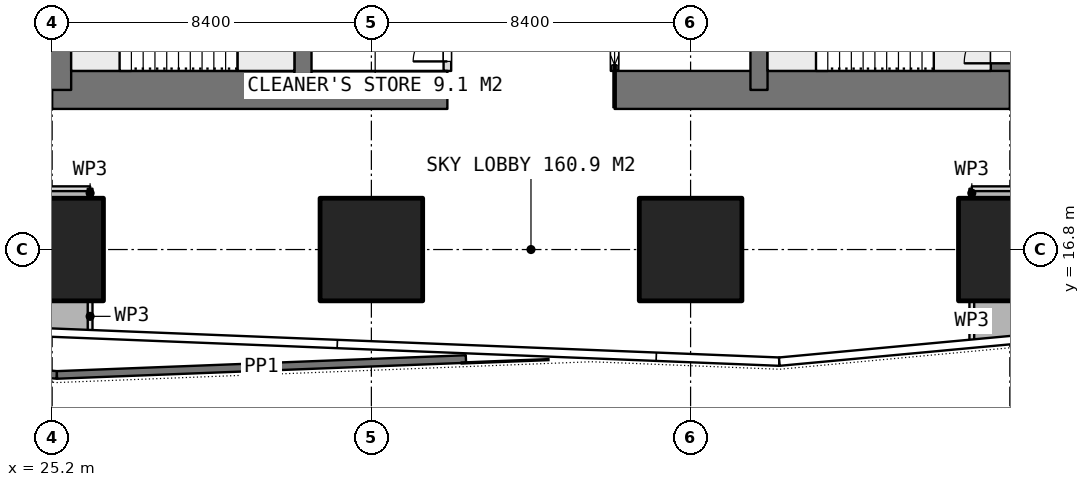
"""IFC4 building model, lengths in metres.
Left out: names, types, materials, properties, quantities, classifications, styles, units other than length and angle.
Written with IfcOpenShell. Run it as: python <this file> out.ifc"""

import sys

from ifc_helpers import new_model, si_unit, direction, frame, frame_2d, origin, origin_2d, place, context, subcontext, project, spatial, rectangle, extrude, element, fill, save


model = new_model("IFC4")
c1 = context("Model", 3, precision=1e-05, world=origin(), true_north=direction((0.0, 1.0)))
c2 = subcontext(c1, "Body", "Model", "MODEL_VIEW")
j1 = project(units=[si_unit("LENGTHUNIT", "METRE"), si_unit("PLANEANGLEUNIT", "RADIAN")], contexts=[c1])
p1 = place(None, origin())
s1 = spatial("IfcSite", under=j1, at=p1, CompositionType="ELEMENT")
p2 = place(p1, origin())
s2 = spatial("IfcBuilding", under=s1, at=p2, CompositionType="ELEMENT")
p3 = place(p2, frame((0.0, 0.0, 168.2)))
s3 = spatial("IfcBuildingStorey", under=s2, at=p3, CompositionType="ELEMENT", Elevation=168.2)
p4 = place(p3, frame((25.2, 21.0, 0.0), z_axis=(0.0, 0.0, 1.0), x_axis=(1.0, 0.0, 0.0)))
e1 = element("IfcWall", 1, at=p4, inside=s3, PredefinedType="SHEAR", context=c2, shape_type="SweptSolid", body=[
    extrude(rectangle(XDim=10.4, YDim=1.0, at=frame_2d((5.2, 0.0))), origin(), (0.0, 0.0, 1.0), 4.5),
])
p5 = place(p3, frame((40.0, 21.0, 0.0), z_axis=(0.0, 0.0, 1.0), x_axis=(1.0, 0.0, 0.0)))
e2 = element("IfcWall", 2, at=p5, inside=s3, PredefinedType="SHEAR", context=c2, shape_type="SweptSolid", body=[
    extrude(rectangle(XDim=10.4, YDim=1.0, at=frame_2d((5.2, 0.0))), origin(), (0.0, 0.0, 1.0), 4.5),
])
p6 = place(p3, frame((25.2, 21.0, 0.0), z_axis=(0.0, 0.0, 1.0), x_axis=(0.0, 1.0, 0.0)))
e3 = element("IfcWall", 3, at=p6, inside=s3, PredefinedType="SHEAR", context=c2, shape_type="SweptSolid", body=[
    extrude(rectangle(XDim=25.2, YDim=1.0, at=frame_2d((12.6, 0.0))), origin(), (0.0, 0.0, 1.0), 4.5),
])
p7 = place(p6, frame((7.8, 0.0, 0.0)))
e4 = element("IfcOpeningElement", 4, at=p7, cuts=e3, PredefinedType="OPENING", context=c2, shape_type="SweptSolid", body=[
    extrude(rectangle(XDim=1.2, YDim=2.1, at=frame_2d((0.6, 1.05))), frame((0.0, 0.51, 0.0), z_axis=(0.0, -1.0, 0.0), x_axis=(1.0, 0.0, 0.0)), (0.0, 0.0, 1.0), 1.02),
])
p8 = place(p6, frame((14.25, 0.0, 0.0)))
e5 = element("IfcOpeningElement", 5, at=p8, cuts=e3, PredefinedType="OPENING", context=c2, shape_type="SweptSolid", body=[
    extrude(rectangle(XDim=0.9, YDim=2.1, at=frame_2d((0.45, 1.05))), frame((0.0, 0.51, 0.0), z_axis=(0.0, -1.0, 0.0), x_axis=(1.0, 0.0, 0.0)), (0.0, 0.0, 1.0), 1.02),
])
p9 = place(p6, frame((16.85, 0.0, 0.0)))
e6 = element("IfcOpeningElement", 6, at=p9, cuts=e3, PredefinedType="OPENING", context=c2, shape_type="SweptSolid", body=[
    extrude(rectangle(XDim=0.9, YDim=2.1, at=frame_2d((0.45, 1.05))), frame((0.0, 0.51, 0.0), z_axis=(0.0, -1.0, 0.0), x_axis=(1.0, 0.0, 0.0)), (0.0, 0.0, 1.0), 1.02),
])
p10 = place(p6, frame((19.025, 0.0, 0.0)))
e7 = element("IfcOpeningElement", 7, at=p10, cuts=e3, PredefinedType="OPENING", context=c2, shape_type="SweptSolid", body=[
    extrude(rectangle(XDim=1.2, YDim=2.1, at=frame_2d((0.6, 1.05))), frame((0.0, 0.51, 0.0), z_axis=(0.0, -1.0, 0.0), x_axis=(1.0, 0.0, 0.0)), (0.0, 0.0, 1.0), 1.02),
])
p11 = place(p3, frame((50.4, 21.0, 0.0), z_axis=(0.0, 0.0, 1.0), x_axis=(0.0, 1.0, 0.0)))
e8 = element("IfcWall", 8, at=p11, inside=s3, PredefinedType="SHEAR", context=c2, shape_type="SweptSolid", body=[
    extrude(rectangle(XDim=25.2, YDim=1.0, at=frame_2d((12.6, 0.0))), origin(), (0.0, 0.0, 1.0), 4.5),
])
p12 = place(p11, frame((16.2, 0.0, 0.0)))
e9 = element("IfcOpeningElement", 9, at=p12, cuts=e8, PredefinedType="OPENING", context=c2, shape_type="SweptSolid", body=[
    extrude(rectangle(XDim=1.2, YDim=2.1, at=frame_2d((0.6, 1.05))), frame((0.0, 0.51, 0.0), z_axis=(0.0, -1.0, 0.0), x_axis=(1.0, 0.0, 0.0)), (0.0, 0.0, 1.0), 1.02),
])
p13 = place(p11, frame((10.05, 0.0, 0.0)))
e10 = element("IfcOpeningElement", 10, at=p13, cuts=e8, PredefinedType="OPENING", context=c2, shape_type="SweptSolid", body=[
    extrude(rectangle(XDim=0.9, YDim=2.1, at=frame_2d((0.45, 1.05))), frame((0.0, 0.51, 0.0), z_axis=(0.0, -1.0, 0.0), x_axis=(1.0, 0.0, 0.0)), (0.0, 0.0, 1.0), 1.02),
])
p14 = place(p11, frame((7.45, 0.0, 0.0)))
e11 = element("IfcOpeningElement", 11, at=p14, cuts=e8, PredefinedType="OPENING", context=c2, shape_type="SweptSolid", body=[
    extrude(rectangle(XDim=0.9, YDim=2.1, at=frame_2d((0.45, 1.05))), frame((0.0, 0.51, 0.0), z_axis=(0.0, -1.0, 0.0), x_axis=(1.0, 0.0, 0.0)), (0.0, 0.0, 1.0), 1.02),
])
p15 = place(p11, frame((0.7, 0.0, 0.0)))
e12 = element("IfcOpeningElement", 12, at=p15, cuts=e8, PredefinedType="OPENING", context=c2, shape_type="SweptSolid", body=[
    extrude(rectangle(XDim=1.2, YDim=2.1, at=frame_2d((0.6, 1.05))), frame((0.0, 0.51, 0.0), z_axis=(0.0, -1.0, 0.0), x_axis=(1.0, 0.0, 0.0)), (0.0, 0.0, 1.0), 1.02),
])
for number, where, z_axis, x_axis in (
    (13, (31.8, 21.0, 0.0), (0.0, 0.0, 1.0), (0.0, 1.0, 0.0)),
    (14, (43.8, 21.0, 0.0), (0.0, 0.0, 1.0), (0.0, 1.0, 0.0)),
):
    element("IfcWall", number, at=place(p3, frame(where, z_axis=z_axis, x_axis=x_axis)), inside=s3, PredefinedType="SHEAR", context=c2, shape_type="SweptSolid", body=[
        extrude(rectangle(XDim=25.2, YDim=0.45, at=frame_2d((12.6, 0.0))), origin(), (0.0, 0.0, 1.0), 4.5),
    ])
for number, where, z_axis, x_axis in (
    (15, (25.2, 16.8, 0.0), (0.0, 0.0, 1.0), (1.0, 0.0, 0.0)),
    (16, (33.6, 16.8, 0.0), (0.0, 0.0, 1.0), (1.0, 0.0, 0.0)),
    (17, (42.0, 16.8, 0.0), (0.0, 0.0, 1.0), (1.0, 0.0, 0.0)),
    (18, (50.4, 16.8, 0.0), (0.0, 0.0, 1.0), (1.0, 0.0, 0.0)),
):
    element("IfcColumn", number, at=place(p3, frame(where, z_axis=z_axis, x_axis=x_axis)), inside=s3, PredefinedType="COLUMN", context=c2, shape_type="SweptSolid", body=[
        extrude(rectangle(XDim=2.7, YDim=2.7, at=origin_2d()), origin(), (0.0, 0.0, 1.0), 4.5),
    ])
p16 = place(p3, frame((8.66, 15.014, 0.0), z_axis=(0.0, 0.0, 1.0), x_axis=(0.995901573545, -0.090443660974, 0.0)))
e19 = element("IfcWall", 19, at=p16, inside=s3, PredefinedType="PARAPET", context=c2, shape_type="SweptSolid", body=[
    extrude(rectangle(XDim=16.733, YDim=0.2, at=frame_2d((8.367, 0.0))), origin(), (0.0, 0.0, 1.0), 1.1),
])
p17 = place(p3, frame((25.325, 13.5, 0.0), z_axis=(0.0, 0.0, 1.0), x_axis=(0.999243289586, 0.03889534955, 0.0)))
e20 = element("IfcWall", 20, at=p17, inside=s3, PredefinedType="PARAPET", context=c2, shape_type="SweptSolid", body=[
    extrude(rectangle(XDim=10.771, YDim=0.2, at=frame_2d((5.385, 0.0))), origin(), (0.0, 0.0, 1.0), 1.1),
])
p18 = place(p3, frame((40.0, 21.5, 0.0), z_axis=(0.0, 0.0, 1.0), x_axis=(0.0, 1.0, 0.0)))
e21 = element("IfcWall", 21, at=p18, inside=s3, PredefinedType="PARTITIONING", context=c2, shape_type="SweptSolid", body=[
    extrude(rectangle(XDim=1.675, YDim=0.2, at=frame_2d((0.837, 0.0))), origin(), (0.0, 0.0, 1.0), 4.25),
])
p19 = place(p18, frame((0.15, 0.0, 0.0)))
e22 = element("IfcOpeningElement", 22, at=p19, cuts=e21, PredefinedType="OPENING", context=c2, shape_type="SweptSolid", body=[
    extrude(rectangle(XDim=1.1, YDim=2.1, at=frame_2d((0.55, 1.05))), frame((0.0, 0.11, 0.0), z_axis=(0.0, -1.0, 0.0), x_axis=(1.0, 0.0, 0.0)), (0.0, 0.0, 1.0), 0.22),
])
p20 = place(p3, frame((35.6, 21.5, 0.0), z_axis=(0.0, 0.0, 1.0), x_axis=(0.0, 1.0, 0.0)))
e23 = element("IfcWall", 23, at=p20, inside=s3, PredefinedType="PARTITIONING", context=c2, shape_type="SweptSolid", body=[
    extrude(rectangle(XDim=1.675, YDim=0.2, at=frame_2d((0.837, 0.0))), origin(), (0.0, 0.0, 1.0), 4.25),
])
p21 = place(p20, frame((0.25, 0.0, 0.0)))
e24 = element("IfcOpeningElement", 24, at=p21, cuts=e23, PredefinedType="OPENING", context=c2, shape_type="SweptSolid", body=[
    extrude(rectangle(XDim=0.9, YDim=2.1, at=frame_2d((0.45, 1.05))), frame((0.0, 0.11, 0.0), z_axis=(0.0, -1.0, 0.0), x_axis=(1.0, 0.0, 0.0)), (0.0, 0.0, 1.0), 0.22),
])
p22 = place(p3, frame((49.4, 14.402, 0.0), z_axis=(0.0, 0.0, 1.0), x_axis=(0.0, 1.0, 0.0)))
e25 = element("IfcWall", 25, at=p22, inside=s3, PredefinedType="PARTITIONING", context=c2, shape_type="SweptSolid", body=[
    extrude(rectangle(XDim=1.028, YDim=0.125, at=frame_2d((0.514, 0.0))), origin(), (0.0, 0.0, 1.0), 4.25),
])
p23 = place(p3, frame((49.4, 18.17, 0.0), z_axis=(0.0, 0.0, 1.0), x_axis=(0.0, 1.0, 0.0)))
e26 = element("IfcWall", 26, at=p23, inside=s3, PredefinedType="PARTITIONING", context=c2, shape_type="SweptSolid", body=[
    extrude(rectangle(XDim=0.23, YDim=0.125, at=frame_2d((0.115, 0.0))), origin(), (0.0, 0.0, 1.0), 4.25),
])
p24 = place(p3, frame((49.4, 18.4, 0.0), z_axis=(0.0, 0.0, 1.0), x_axis=(1.0, 0.0, 0.0)))
e27 = element("IfcWall", 27, at=p24, inside=s3, PredefinedType="PARTITIONING", context=c2, shape_type="SweptSolid", body=[
    extrude(rectangle(XDim=7.0, YDim=0.125, at=frame_2d((3.5, 0.0))), origin(), (0.0, 0.0, 1.0), 4.25),
])
p25 = place(p24, frame((3.0, 0.0, 0.0)))
e28 = element("IfcOpeningElement", 28, at=p25, cuts=e27, PredefinedType="OPENING", context=c2, shape_type="SweptSolid", body=[
    extrude(rectangle(XDim=1.0, YDim=2.1, at=frame_2d((0.5, 1.05))), frame((0.0, 0.073, 0.0), z_axis=(0.0, -1.0, 0.0), x_axis=(1.0, 0.0, 0.0)), (0.0, 0.0, 1.0), 0.145),
])
p26 = place(p3, frame((19.2, 18.4, 0.0), z_axis=(0.0, 0.0, 1.0), x_axis=(1.0, 0.0, 0.0)))
e29 = element("IfcWall", 29, at=p26, inside=s3, PredefinedType="PARTITIONING", context=c2, shape_type="SweptSolid", body=[
    extrude(rectangle(XDim=6.999, YDim=0.125, at=frame_2d((3.5, 0.0))), origin(), (0.0, 0.0, 1.0), 4.25),
])
p27 = place(p26, frame((2.6, 0.0, 0.0)))
e30 = element("IfcOpeningElement", 30, at=p27, cuts=e29, PredefinedType="OPENING", context=c2, shape_type="SweptSolid", body=[
    extrude(rectangle(XDim=1.8, YDim=2.1, at=frame_2d((0.9, 1.05))), frame((0.0, 0.073, 0.0), z_axis=(0.0, -1.0, 0.0), x_axis=(1.0, 0.0, 0.0)), (0.0, 0.0, 1.0), 0.145),
])
p28 = place(p3, frame((26.199, 18.4, 0.0), z_axis=(0.0, 0.0, 1.0), x_axis=(0.0, -1.0, 0.0)))
e31 = element("IfcWall", 31, at=p28, inside=s3, PredefinedType="PARTITIONING", context=c2, shape_type="SweptSolid", body=[
    extrude(rectangle(XDim=0.23, YDim=0.125, at=frame_2d((0.115, 0.0))), origin(), (0.0, 0.0, 1.0), 4.25),
])
p29 = place(p3, frame((26.199, 15.43, 0.0), z_axis=(0.0, 0.0, 1.0), x_axis=(0.0, -1.0, 0.0)))
e32 = element("IfcWall", 32, at=p29, inside=s3, PredefinedType="PARTITIONING", context=c2, shape_type="SweptSolid", body=[
    extrude(rectangle(XDim=0.776, YDim=0.125, at=frame_2d((0.388, 0.0))), origin(), (0.0, 0.0, 1.0), 4.25),
])
p30 = place(p19, origin())
e33 = element("IfcDoor", 33, at=p30, inside=s3, OperationType="SLIDING_TO_LEFT", PredefinedType="DOOR", context=c2, shape_type="SweptSolid", body=[
    extrude(rectangle(XDim=1.1, YDim=2.1, at=frame_2d((0.55, 1.05))), frame((0.0, 0.025, 0.0), z_axis=(0.0, -1.0, 0.0), x_axis=(1.0, 0.0, 0.0)), (0.0, 0.0, 1.0), 0.05),
])
fill(e22, e33)
p31 = place(p21, origin())
e34 = element("IfcDoor", 34, at=p31, inside=s3, OperationType="SINGLE_SWING_LEFT", PredefinedType="DOOR", context=c2, shape_type="SweptSolid", body=[
    extrude(rectangle(XDim=0.9, YDim=2.1, at=frame_2d((0.45, 1.05))), frame((0.0, 0.025, 0.0), z_axis=(0.0, -1.0, 0.0), x_axis=(1.0, 0.0, 0.0)), (0.0, 0.0, 1.0), 0.05),
])
fill(e24, e34)
p32 = place(p15, origin())
e35 = element("IfcDoor", 35, at=p32, inside=s3, OperationType="SINGLE_SWING_RIGHT", PredefinedType="DOOR", context=c2, shape_type="SweptSolid", body=[
    extrude(rectangle(XDim=1.2, YDim=2.1, at=frame_2d((0.6, 1.05))), frame((0.0, 0.025, 0.0), z_axis=(0.0, -1.0, 0.0), x_axis=(1.0, 0.0, 0.0)), (0.0, 0.0, 1.0), 0.05),
])
fill(e12, e35)
save(model, sys.argv[1])
